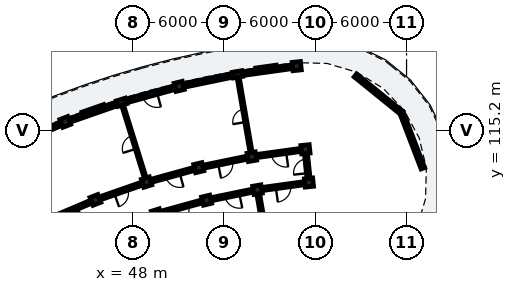
"""IFC4 building model, lengths in metres.
Left out: names, types, materials, properties, quantities, classifications, styles, units other than length and angle.
Written with IfcOpenShell. Run it as: python <this file> out.ifc"""

import sys

from ifc_helpers import new_model, si_unit, direction, frame, frame_2d, origin, origin_2d, place, context, subcontext, project, spatial, rectangle, extrude, element, fill, save


model = new_model("IFC4")
c1 = context("Model", 3, precision=1e-05, world=origin(), true_north=direction((0.0, 1.0)))
c2 = subcontext(c1, "Body", "Model", "MODEL_VIEW")
j1 = project(units=[si_unit("LENGTHUNIT", "METRE"), si_unit("PLANEANGLEUNIT", "RADIAN")], contexts=[c1])
p1 = place(None, origin())
s1 = spatial("IfcSite", under=j1, at=p1, CompositionType="ELEMENT")
p2 = place(p1, origin())
s2 = spatial("IfcBuilding", under=s1, at=p2, CompositionType="ELEMENT")
p3 = place(p2, frame((0.0, 0.0, 15.56)))
s3 = spatial("IfcBuildingStorey", under=s2, at=p3, CompositionType="ELEMENT", Elevation=15.56)
for number, where, z_axis, x_axis in (
    (1, (59.58, 111.766, 0.0), (0.0, 0.0, 1.0), (-0.105, 0.995, 0.0)),
    (2, (59.35, 113.954, 0.0), (0.0, 0.0, 1.0), (-0.105, 0.995, 0.0)),
    (3, (58.775, 119.424, 0.0), (0.0, 0.0, 1.0), (-0.105, 0.995, 0.0)),
    (4, (56.194, 111.297, 0.0), (0.0, 0.0, 1.0), (-0.17, 0.985, 0.0)),
    (5, (55.821, 113.465, 0.0), (0.0, 0.0, 1.0), (-0.17, 0.985, 0.0)),
):
    element("IfcColumn", number, at=place(p3, frame(where, z_axis=z_axis, x_axis=x_axis)), inside=s3, PredefinedType="COLUMN", context=c2, shape_type="SweptSolid", body=[
        extrude(rectangle(XDim=0.55, YDim=0.55, at=origin_2d()), origin(), (0.0, 0.0, 1.0), 3.11),
    ])
p4 = place(p3, frame((54.887, 118.885, 0.0), z_axis=(0.0, 0.0, 1.0), x_axis=(-0.169827298811, 0.985473839622, 0.0)))
e6 = element("IfcColumn", 6, at=p4, inside=s3, PredefinedType="PILASTER", context=c2, shape_type="SweptSolid", body=[
    extrude(rectangle(XDim=0.38, YDim=0.62, at=origin_2d()), origin(), (0.0, 0.0, 1.0), 3.11),
])
for number, where, z_axis, x_axis in (
    (7, (52.847, 110.606, 0.0), (0.0, 0.0, 1.0), (-0.234, 0.972, 0.0)),
    (8, (52.331, 112.744, 0.0), (0.0, 0.0, 1.0), (-0.234, 0.972, 0.0)),
    (9, (51.042, 118.091, 0.0), (0.0, 0.0, 1.0), (-0.234, 0.972, 0.0)),
    (10, (49.552, 109.695, 0.0), (0.0, 0.0, 1.0), (-0.298, 0.955, 0.0)),
    (11, (48.897, 111.795, 0.0), (0.0, 0.0, 1.0), (-0.298, 0.955, 0.0)),
):
    element("IfcColumn", number, at=place(p3, frame(where, z_axis=z_axis, x_axis=x_axis)), inside=s3, PredefinedType="COLUMN", context=c2, shape_type="SweptSolid", body=[
        extrude(rectangle(XDim=0.55, YDim=0.55, at=origin_2d()), origin(), (0.0, 0.0, 1.0), 3.11),
    ])
p5 = place(p3, frame((47.258, 117.046, 0.0), z_axis=(0.0, 0.0, 1.0), x_axis=(-0.297930292146, 0.954587628781, 0.0)))
e12 = element("IfcColumn", 12, at=p5, inside=s3, PredefinedType="PILASTER", context=c2, shape_type="SweptSolid", body=[
    extrude(rectangle(XDim=0.38, YDim=0.62, at=origin_2d()), origin(), (0.0, 0.0, 1.0), 3.11),
])
for number, where, z_axis, x_axis in (
    (13, (45.532, 110.622, 0.0), (0.0, 0.0, 1.0), (-0.36, 0.933, 0.0)),
    (14, (43.552, 115.753, 0.0), (0.0, 0.0, 1.0), (-0.36, 0.933, 0.0)),
):
    element("IfcColumn", number, at=place(p3, frame(where, z_axis=z_axis, x_axis=x_axis)), inside=s3, PredefinedType="COLUMN", context=c2, shape_type="SweptSolid", body=[
        extrude(rectangle(XDim=0.55, YDim=0.55, at=origin_2d()), origin(), (0.0, 0.0, 1.0), 3.11),
    ])
p6 = place(p3, frame((58.533, 119.39, 0.0), z_axis=(0.0, 0.0, 1.0), x_axis=(-0.990539718913, -0.137226328578, 0.0)))
e15 = element("IfcWall", 15, at=p6, inside=s3, PredefinedType="SOLIDWALL", context=c2, shape_type="SweptSolid", body=[
    extrude(rectangle(XDim=3.521, YDim=0.245, at=frame_2d((1.76, 0.0))), origin(), (0.0, 0.0, 1.0), 2.355),
])
p7 = place(p6, frame((1.085, 0.0, 0.35)))
e16 = element("IfcOpeningElement", 16, at=p7, cuts=e15, PredefinedType="OPENING", context=c2, shape_type="SweptSolid", body=[
    extrude(rectangle(XDim=1.35, YDim=1.65, at=frame_2d((0.675, 0.825))), frame((0.0, 0.133, 0.0), z_axis=(0.0, -1.0, 0.0), x_axis=(1.0, 0.0, 0.0)), (0.0, 0.0, 1.0), 0.265),
])
p8 = place(p3, frame((54.73, 118.853, 0.0), z_axis=(0.0, 0.0, 1.0), x_axis=(-0.979340051053, -0.202220336275, 0.0)))
e17 = element("IfcWall", 17, at=p8, inside=s3, PredefinedType="SOLIDWALL", context=c2, shape_type="SweptSolid", body=[
    extrude(rectangle(XDim=3.521, YDim=0.245, at=frame_2d((1.76, 0.0))), origin(), (0.0, 0.0, 1.0), 2.355),
])
p9 = place(p8, frame((1.01, 0.0, 0.35)))
e18 = element("IfcOpeningElement", 18, at=p9, cuts=e17, PredefinedType="OPENING", context=c2, shape_type="SweptSolid", body=[
    extrude(rectangle(XDim=1.5, YDim=1.7, at=frame_2d((0.75, 0.85))), frame((0.0, 0.133, 0.0), z_axis=(0.0, -1.0, 0.0), x_axis=(1.0, 0.0, 0.0)), (0.0, 0.0, 1.0), 0.265),
])
p10 = place(p3, frame((50.806, 118.026, 0.0), z_axis=(0.0, 0.0, 1.0), x_axis=(-0.963899390209, -0.266266718826, 0.0)))
e19 = element("IfcWall", 19, at=p10, inside=s3, PredefinedType="SOLIDWALL", context=c2, shape_type="SweptSolid", body=[
    extrude(rectangle(XDim=3.521, YDim=0.245, at=frame_2d((1.76, 0.0))), origin(), (0.0, 0.0, 1.0), 2.355),
])
p11 = place(p10, frame((1.271, 0.0, 0.0)))
e20 = element("IfcOpeningElement", 20, at=p11, cuts=e19, PredefinedType="OPENING", context=c2, shape_type="SweptSolid", body=[
    extrude(rectangle(XDim=0.98, YDim=2.12, at=frame_2d((0.49, 1.06))), frame((0.0, 0.133, 0.0), z_axis=(0.0, -1.0, 0.0), x_axis=(1.0, 0.0, 0.0)), (0.0, 0.0, 1.0), 0.265),
])
p12 = place(p3, frame((47.107, 116.993, 0.0), z_axis=(0.0, 0.0, 1.0), x_axis=(-0.944267366677, -0.329179495455, 0.0)))
e21 = element("IfcWall", 21, at=p12, inside=s3, PredefinedType="SOLIDWALL", context=c2, shape_type="SweptSolid", body=[
    extrude(rectangle(XDim=3.521, YDim=0.245, at=frame_2d((1.76, 0.0))), origin(), (0.0, 0.0, 1.0), 2.355),
])
p13 = place(p12, frame((0.86, 0.0, 0.35)))
e22 = element("IfcOpeningElement", 22, at=p13, cuts=e21, PredefinedType="OPENING", context=c2, shape_type="SweptSolid", body=[
    extrude(rectangle(XDim=1.8, YDim=1.85, at=frame_2d((0.9, 0.925))), frame((0.0, 0.133, 0.0), z_axis=(0.0, -1.0, 0.0), x_axis=(1.0, 0.0, 0.0)), (0.0, 0.0, 1.0), 0.265),
])
p14 = place(p3, frame((43.326, 115.657, 0.0), z_axis=(0.0, 0.0, 1.0), x_axis=(-0.920502438884, -0.390736816807, 0.0)))
e23 = element("IfcWall", 23, at=p14, inside=s3, PredefinedType="SOLIDWALL", context=c2, shape_type="SweptSolid", body=[
    extrude(rectangle(XDim=3.521, YDim=0.245, at=frame_2d((1.76, 0.0))), origin(), (0.0, 0.0, 1.0), 2.355),
])
p15 = place(p14, frame((1.12, 0.0, 0.55)))
e24 = element("IfcOpeningElement", 24, at=p15, cuts=e23, PredefinedType="OPENING", context=c2, shape_type="SweptSolid", body=[
    extrude(rectangle(XDim=1.28, YDim=1.52, at=frame_2d((0.64, 0.76))), frame((0.0, 0.133, 0.0), z_axis=(0.0, -1.0, 0.0), x_axis=(1.0, 0.0, 0.0)), (0.0, 0.0, 1.0), 0.265),
])
p16 = place(p3, frame((62.635, 118.812, 0.0), z_axis=(0.0, 0.0, 1.0), x_axis=(0.777137204109, -0.629331205321, 0.0)))
e25 = element("IfcWall", 25, at=p16, inside=s3, PredefinedType="SOLIDWALL", context=c2, shape_type="SweptSolid", body=[
    extrude(rectangle(XDim=3.908, YDim=0.245, at=frame_2d((1.954, 0.0))), origin(), (0.0, 0.0, 1.0), 2.355),
])
p17 = place(p16, frame((0.979, 0.0, 0.4)))
e26 = element("IfcOpeningElement", 26, at=p17, cuts=e25, PredefinedType="OPENING", context=c2, shape_type="SweptSolid", body=[
    extrude(rectangle(XDim=1.95, YDim=1.78, at=frame_2d((0.975, 0.89))), frame((0.0, 0.133, 0.0), z_axis=(0.0, -1.0, 0.0), x_axis=(1.0, 0.0, 0.0)), (0.0, 0.0, 1.0), 0.265),
])
p18 = place(p3, frame((65.673, 116.353, 0.0), z_axis=(0.0, 0.0, 1.0), x_axis=(0.358376224971, -0.933577249817, 0.0)))
e27 = element("IfcWall", 27, at=p18, inside=s3, PredefinedType="SOLIDWALL", context=c2, shape_type="SweptSolid", body=[
    extrude(rectangle(XDim=3.908, YDim=0.245, at=frame_2d((1.954, 0.0))), origin(), (0.0, 0.0, 1.0), 2.355),
])
p19 = place(p3, frame((59.004, 113.906, 0.0), z_axis=(0.0, 0.0, 1.0), x_axis=(-0.990544162976, -0.137194246211, 0.0)))
e28 = element("IfcWall", 28, at=p19, inside=s3, PredefinedType="PARTITIONING", context=c2, shape_type="SweptSolid", body=[
    extrude(rectangle(XDim=2.863, YDim=0.205, at=frame_2d((1.432, 0.0))), origin(), (0.0, 0.0, 1.0), 2.37),
])
p20 = place(p19, frame((0.937, 0.0, 0.0)))
e29 = element("IfcOpeningElement", 29, at=p20, cuts=e28, PredefinedType="OPENING", context=c2, shape_type="SweptSolid", body=[
    extrude(rectangle(XDim=0.99, YDim=2.16, at=frame_2d((0.495, 1.08))), frame((0.0, 0.113, 0.0), z_axis=(0.0, -1.0, 0.0), x_axis=(1.0, 0.0, 0.0)), (0.0, 0.0, 1.0), 0.225),
])
p21 = place(p3, frame((59.233, 111.718, 0.0), z_axis=(0.0, 0.0, 1.0), x_axis=(-0.990535404475, -0.137257467855, 0.0)))
e30 = element("IfcWall", 30, at=p21, inside=s3, PredefinedType="PARTITIONING", context=c2, shape_type="SweptSolid", body=[
    extrude(rectangle(XDim=2.718, YDim=0.205, at=frame_2d((1.359, 0.0))), origin(), (0.0, 0.0, 1.0), 2.37),
])
p22 = place(p21, frame((0.864, 0.0, 0.0)))
e31 = element("IfcOpeningElement", 31, at=p22, cuts=e30, PredefinedType="OPENING", context=c2, shape_type="SweptSolid", body=[
    extrude(rectangle(XDim=0.99, YDim=2.16, at=frame_2d((0.495, 1.08))), frame((0.0, 0.113, 0.0), z_axis=(0.0, -1.0, 0.0), x_axis=(1.0, 0.0, 0.0)), (0.0, 0.0, 1.0), 0.225),
])
p23 = place(p3, frame((55.753, 113.859, 0.0), z_axis=(0.0, 0.0, 1.0), x_axis=(-0.169812980219, 0.985476307046, 0.0)))
e32 = element("IfcWall", 32, at=p23, inside=s3, PredefinedType="PLUMBINGWALL", context=c2, shape_type="SweptSolid", body=[
    extrude(rectangle(XDim=4.7, YDim=0.14, at=frame_2d((2.35, 0.0))), origin(), (0.0, 0.0, 1.0), 2.37),
])
p24 = place(p23, frame((1.92, 0.0, 0.0)))
e33 = element("IfcOpeningElement", 33, at=p24, cuts=e32, PredefinedType="OPENING", context=c2, shape_type="SweptSolid", body=[
    extrude(rectangle(XDim=0.86, YDim=2.06, at=frame_2d((0.43, 1.03))), frame((0.0, 0.08, 0.0), z_axis=(0.0, -1.0, 0.0), x_axis=(1.0, 0.0, 0.0)), (0.0, 0.0, 1.0), 0.16),
])
p25 = place(p3, frame((57.383, 104.398, 0.0), z_axis=(0.0, 0.0, 1.0), x_axis=(-0.169825160084, 0.985474208187, 0.0)))
e34 = element("IfcWall", 34, at=p25, inside=s3, PredefinedType="PARTITIONING", context=c2, shape_type="SweptSolid", body=[
    extrude(rectangle(XDim=6.6, YDim=0.185, at=frame_2d((3.3, 0.0))), origin(), (0.0, 0.0, 1.0), 2.37),
])
p26 = place(p3, frame((55.478, 113.394, 0.0), z_axis=(0.0, 0.0, 1.0), x_axis=(-0.979348418612, -0.202179808492, 0.0)))
e35 = element("IfcWall", 35, at=p26, inside=s3, PredefinedType="PARTITIONING", context=c2, shape_type="SweptSolid", body=[
    extrude(rectangle(XDim=2.863, YDim=0.205, at=frame_2d((1.432, 0.0))), origin(), (0.0, 0.0, 1.0), 2.37),
])
p27 = place(p26, frame((0.947, 0.0, 0.0)))
e36 = element("IfcOpeningElement", 36, at=p27, cuts=e35, PredefinedType="OPENING", context=c2, shape_type="SweptSolid", body=[
    extrude(rectangle(XDim=0.97, YDim=2.15, at=frame_2d((0.485, 1.075))), frame((0.0, 0.113, 0.0), z_axis=(0.0, -1.0, 0.0), x_axis=(1.0, 0.0, 0.0)), (0.0, 0.0, 1.0), 0.225),
])
p28 = place(p3, frame((55.852, 111.226, 0.0), z_axis=(0.0, 0.0, 1.0), x_axis=(-0.979349423541, -0.202174940608, 0.0)))
e37 = element("IfcWall", 37, at=p28, inside=s3, PredefinedType="PARTITIONING", context=c2, shape_type="SweptSolid", body=[
    extrude(rectangle(XDim=2.718, YDim=0.205, at=frame_2d((1.359, 0.0))), origin(), (0.0, 0.0, 1.0), 2.37),
])
p29 = place(p28, frame((0.874, 0.0, 0.0)))
e38 = element("IfcOpeningElement", 38, at=p29, cuts=e37, PredefinedType="OPENING", context=c2, shape_type="SweptSolid", body=[
    extrude(rectangle(XDim=0.97, YDim=2.15, at=frame_2d((0.485, 1.075))), frame((0.0, 0.113, 0.0), z_axis=(0.0, -1.0, 0.0), x_axis=(1.0, 0.0, 0.0)), (0.0, 0.0, 1.0), 0.225),
])
p30 = place(p3, frame((51.994, 112.651, 0.0), z_axis=(0.0, 0.0, 1.0), x_axis=(-0.963890789093, -0.266297853356, 0.0)))
e39 = element("IfcWall", 39, at=p30, inside=s3, PredefinedType="PARTITIONING", context=c2, shape_type="SweptSolid", body=[
    extrude(rectangle(XDim=2.863, YDim=0.205, at=frame_2d((1.432, 0.0))), origin(), (0.0, 0.0, 1.0), 2.37),
])
p31 = place(p30, frame((0.957, 0.0, 0.0)))
e40 = element("IfcOpeningElement", 40, at=p31, cuts=e39, PredefinedType="OPENING", context=c2, shape_type="SweptSolid", body=[
    extrude(rectangle(XDim=0.95, YDim=2.13, at=frame_2d((0.475, 1.065))), frame((0.0, 0.113, 0.0), z_axis=(0.0, -1.0, 0.0), x_axis=(1.0, 0.0, 0.0)), (0.0, 0.0, 1.0), 0.225),
])
p32 = place(p3, frame((52.51, 110.512, 0.0), z_axis=(0.0, 0.0, 1.0), x_axis=(-0.96388375821, -0.266323301006, 0.0)))
e41 = element("IfcWall", 41, at=p32, inside=s3, PredefinedType="PARTITIONING", context=c2, shape_type="SweptSolid", body=[
    extrude(rectangle(XDim=2.718, YDim=0.205, at=frame_2d((1.359, 0.0))), origin(), (0.0, 0.0, 1.0), 2.37),
])
p33 = place(p32, frame((0.884, 0.0, 0.0)))
e42 = element("IfcOpeningElement", 42, at=p33, cuts=e41, PredefinedType="OPENING", context=c2, shape_type="SweptSolid", body=[
    extrude(rectangle(XDim=0.95, YDim=2.13, at=frame_2d((0.475, 1.065))), frame((0.0, 0.113, 0.0), z_axis=(0.0, -1.0, 0.0), x_axis=(1.0, 0.0, 0.0)), (0.0, 0.0, 1.0), 0.225),
])
p34 = place(p3, frame((48.778, 112.177, 0.0), z_axis=(0.0, 0.0, 1.0), x_axis=(-0.297905254614, 0.954595442726, 0.0)))
e43 = element("IfcWall", 43, at=p34, inside=s3, PredefinedType="PARTITIONING", context=c2, shape_type="SweptSolid", body=[
    extrude(rectangle(XDim=4.7, YDim=0.125, at=frame_2d((2.35, 0.0))), origin(), (0.0, 0.0, 1.0), 2.37),
])
p35 = place(p34, frame((1.895, 0.0, 0.0)))
e44 = element("IfcOpeningElement", 44, at=p35, cuts=e43, PredefinedType="OPENING", context=c2, shape_type="SweptSolid", body=[
    extrude(rectangle(XDim=0.91, YDim=2.1, at=frame_2d((0.455, 1.05))), frame((0.0, 0.073, 0.0), z_axis=(0.0, -1.0, 0.0), x_axis=(1.0, 0.0, 0.0)), (0.0, 0.0, 1.0), 0.145),
])
p36 = place(p3, frame((48.566, 111.68, 0.0), z_axis=(0.0, 0.0, 1.0), x_axis=(-0.944253820929, -0.329218349522, 0.0)))
e45 = element("IfcWall", 45, at=p36, inside=s3, PredefinedType="PARTITIONING", context=c2, shape_type="SweptSolid", body=[
    extrude(rectangle(XDim=2.863, YDim=0.205, at=frame_2d((1.432, 0.0))), origin(), (0.0, 0.0, 1.0), 2.37),
])
p37 = place(p36, frame((0.967, 0.0, 0.0)))
e46 = element("IfcOpeningElement", 46, at=p37, cuts=e45, PredefinedType="OPENING", context=c2, shape_type="SweptSolid", body=[
    extrude(rectangle(XDim=0.93, YDim=2.12, at=frame_2d((0.465, 1.06))), frame((0.0, 0.113, 0.0), z_axis=(0.0, -1.0, 0.0), x_axis=(1.0, 0.0, 0.0)), (0.0, 0.0, 1.0), 0.225),
])
p38 = place(p3, frame((45.21, 110.486, 0.0), z_axis=(0.0, 0.0, 1.0), x_axis=(-0.920511160294, -0.390716270168, 0.0)))
e47 = element("IfcWall", 47, at=p38, inside=s3, PredefinedType="PARTITIONING", context=c2, shape_type="SweptSolid", body=[
    extrude(rectangle(XDim=2.863, YDim=0.205, at=frame_2d((1.432, 0.0))), origin(), (0.0, 0.0, 1.0), 2.37),
])
p39 = place(p38, frame((0.937, 0.0, 0.0)))
e48 = element("IfcOpeningElement", 48, at=p39, cuts=e47, PredefinedType="OPENING", context=c2, shape_type="SweptSolid", body=[
    extrude(rectangle(XDim=0.99, YDim=2.16, at=frame_2d((0.495, 1.08))), frame((0.0, 0.113, 0.0), z_axis=(0.0, -1.0, 0.0), x_axis=(1.0, 0.0, 0.0)), (0.0, 0.0, 1.0), 0.225),
])
p40 = place(p3, frame((59.575, 111.816, 0.0), z_axis=(0.0, 0.0, 1.0), x_axis=(-0.104509292252, 0.994523910136, 0.0)))
e49 = element("IfcWall", 49, at=p40, inside=s3, PredefinedType="PARTITIONING", context=c2, shape_type="SweptSolid", body=[
    extrude(rectangle(XDim=2.1, YDim=0.205, at=frame_2d((1.05, 0.0))), origin(), (0.0, 0.0, 1.0), 2.37),
])
p41 = place(p40, frame((0.57, 0.0, 0.0)))
e50 = element("IfcOpeningElement", 50, at=p41, cuts=e49, PredefinedType="OPENING", context=c2, shape_type="SweptSolid", body=[
    extrude(rectangle(XDim=0.95, YDim=2.13, at=frame_2d((0.475, 1.065))), frame((0.0, 0.113, 0.0), z_axis=(0.0, -1.0, 0.0), x_axis=(1.0, 0.0, 0.0)), (0.0, 0.0, 1.0), 0.225),
])
p42 = place(p7, origin())
e51 = element("IfcWindow", 51, at=p42, inside=s3, PartitioningType="SINGLE_PANEL", PredefinedType="WINDOW", context=c2, shape_type="SweptSolid", body=[
    extrude(rectangle(XDim=1.35, YDim=1.65, at=frame_2d((0.675, 0.825))), frame((0.0, 0.03, 0.0), z_axis=(0.0, -1.0, 0.0), x_axis=(1.0, 0.0, 0.0)), (0.0, 0.0, 1.0), 0.06),
])
fill(e16, e51)
p43 = place(p9, origin())
e52 = element("IfcWindow", 52, at=p43, inside=s3, PartitioningType="SINGLE_PANEL", PredefinedType="WINDOW", context=c2, shape_type="SweptSolid", body=[
    extrude(rectangle(XDim=1.5, YDim=1.7, at=frame_2d((0.75, 0.85))), frame((0.0, 0.03, 0.0), z_axis=(0.0, -1.0, 0.0), x_axis=(1.0, 0.0, 0.0)), (0.0, 0.0, 1.0), 0.06),
])
fill(e18, e52)
p44 = place(p11, origin())
e53 = element("IfcDoor", 53, at=p44, inside=s3, OperationType="SINGLE_SWING_LEFT", PredefinedType="DOOR", context=c2, shape_type="SweptSolid", body=[
    extrude(rectangle(XDim=0.98, YDim=2.12, at=frame_2d((0.49, 1.06))), frame((0.0, 0.025, 0.0), z_axis=(0.0, -1.0, 0.0), x_axis=(1.0, 0.0, 0.0)), (0.0, 0.0, 1.0), 0.05),
])
fill(e20, e53)
p45 = place(p13, origin())
e54 = element("IfcWindow", 54, at=p45, inside=s3, PartitioningType="SINGLE_PANEL", PredefinedType="WINDOW", context=c2, shape_type="SweptSolid", body=[
    extrude(rectangle(XDim=1.8, YDim=1.85, at=frame_2d((0.9, 0.925))), frame((0.0, 0.03, 0.0), z_axis=(0.0, -1.0, 0.0), x_axis=(1.0, 0.0, 0.0)), (0.0, 0.0, 1.0), 0.06),
])
fill(e22, e54)
p46 = place(p17, origin())
e55 = element("IfcWindow", 55, at=p46, inside=s3, PartitioningType="SINGLE_PANEL", PredefinedType="WINDOW", context=c2, shape_type="SweptSolid", body=[
    extrude(rectangle(XDim=1.95, YDim=1.78, at=frame_2d((0.975, 0.89))), frame((0.0, 0.03, 0.0), z_axis=(0.0, -1.0, 0.0), x_axis=(1.0, 0.0, 0.0)), (0.0, 0.0, 1.0), 0.06),
])
fill(e26, e55)
p47 = place(p20, origin())
e56 = element("IfcDoor", 56, at=p47, inside=s3, OperationType="SINGLE_SWING_LEFT", PredefinedType="DOOR", context=c2, shape_type="SweptSolid", body=[
    extrude(rectangle(XDim=0.99, YDim=2.16, at=frame_2d((0.495, 1.08))), frame((0.0, 0.025, 0.0), z_axis=(0.0, -1.0, 0.0), x_axis=(1.0, 0.0, 0.0)), (0.0, 0.0, 1.0), 0.05),
])
fill(e29, e56)
p48 = place(p22, origin())
e57 = element("IfcDoor", 57, at=p48, inside=s3, OperationType="SINGLE_SWING_RIGHT", PredefinedType="DOOR", context=c2, shape_type="SweptSolid", body=[
    extrude(rectangle(XDim=0.99, YDim=2.16, at=frame_2d((0.495, 1.08))), frame((0.0, 0.025, 0.0), z_axis=(0.0, -1.0, 0.0), x_axis=(1.0, 0.0, 0.0)), (0.0, 0.0, 1.0), 0.05),
])
fill(e31, e57)
p49 = place(p24, origin())
e58 = element("IfcDoor", 58, at=p49, inside=s3, OperationType="SINGLE_SWING_LEFT", PredefinedType="DOOR", context=c2, shape_type="SweptSolid", body=[
    extrude(rectangle(XDim=0.86, YDim=2.06, at=frame_2d((0.43, 1.03))), frame((0.0, 0.025, 0.0), z_axis=(0.0, -1.0, 0.0), x_axis=(1.0, 0.0, 0.0)), (0.0, 0.0, 1.0), 0.05),
])
fill(e33, e58)
p50 = place(p27, origin())
e59 = element("IfcDoor", 59, at=p50, inside=s3, OperationType="SINGLE_SWING_RIGHT", PredefinedType="DOOR", context=c2, shape_type="SweptSolid", body=[
    extrude(rectangle(XDim=0.97, YDim=2.15, at=frame_2d((0.485, 1.075))), frame((0.0, 0.025, 0.0), z_axis=(0.0, -1.0, 0.0), x_axis=(1.0, 0.0, 0.0)), (0.0, 0.0, 1.0), 0.05),
])
fill(e36, e59)
p51 = place(p29, origin())
e60 = element("IfcDoor", 60, at=p51, inside=s3, OperationType="SINGLE_SWING_LEFT", PredefinedType="DOOR", context=c2, shape_type="SweptSolid", body=[
    extrude(rectangle(XDim=0.97, YDim=2.15, at=frame_2d((0.485, 1.075))), frame((0.0, 0.025, 0.0), z_axis=(0.0, -1.0, 0.0), x_axis=(1.0, 0.0, 0.0)), (0.0, 0.0, 1.0), 0.05),
])
fill(e38, e60)
p52 = place(p31, origin())
e61 = element("IfcDoor", 61, at=p52, inside=s3, OperationType="SINGLE_SWING_LEFT", PredefinedType="DOOR", context=c2, shape_type="SweptSolid", body=[
    extrude(rectangle(XDim=0.95, YDim=2.13, at=frame_2d((0.475, 1.065))), frame((0.0, 0.025, 0.0), z_axis=(0.0, -1.0, 0.0), x_axis=(1.0, 0.0, 0.0)), (0.0, 0.0, 1.0), 0.05),
])
fill(e40, e61)
p53 = place(p33, origin())
e62 = element("IfcDoor", 62, at=p53, inside=s3, OperationType="SINGLE_SWING_RIGHT", PredefinedType="DOOR", context=c2, shape_type="SweptSolid", body=[
    extrude(rectangle(XDim=0.95, YDim=2.13, at=frame_2d((0.475, 1.065))), frame((0.0, 0.025, 0.0), z_axis=(0.0, -1.0, 0.0), x_axis=(1.0, 0.0, 0.0)), (0.0, 0.0, 1.0), 0.05),
])
fill(e42, e62)
p54 = place(p35, origin())
e63 = element("IfcDoor", 63, at=p54, inside=s3, OperationType="SINGLE_SWING_LEFT", PredefinedType="DOOR", context=c2, shape_type="SweptSolid", body=[
    extrude(rectangle(XDim=0.91, YDim=2.1, at=frame_2d((0.455, 1.05))), frame((0.0, 0.025, 0.0), z_axis=(0.0, -1.0, 0.0), x_axis=(1.0, 0.0, 0.0)), (0.0, 0.0, 1.0), 0.05),
])
fill(e44, e63)
p55 = place(p37, origin())
e64 = element("IfcDoor", 64, at=p55, inside=s3, OperationType="SINGLE_SWING_RIGHT", PredefinedType="DOOR", context=c2, shape_type="SweptSolid", body=[
    extrude(rectangle(XDim=0.93, YDim=2.12, at=frame_2d((0.465, 1.06))), frame((0.0, 0.025, 0.0), z_axis=(0.0, -1.0, 0.0), x_axis=(1.0, 0.0, 0.0)), (0.0, 0.0, 1.0), 0.05),
])
fill(e46, e64)
p56 = place(p39, origin())
e65 = element("IfcDoor", 65, at=p56, inside=s3, OperationType="SINGLE_SWING_LEFT", PredefinedType="DOOR", context=c2, shape_type="SweptSolid", body=[
    extrude(rectangle(XDim=0.99, YDim=2.16, at=frame_2d((0.495, 1.08))), frame((0.0, 0.025, 0.0), z_axis=(0.0, -1.0, 0.0), x_axis=(1.0, 0.0, 0.0)), (0.0, 0.0, 1.0), 0.05),
])
fill(e48, e65)
p57 = place(p41, origin())
e66 = element("IfcDoor", 66, at=p57, inside=s3, OperationType="SINGLE_SWING_LEFT", PredefinedType="DOOR", context=c2, shape_type="SweptSolid", body=[
    extrude(rectangle(XDim=0.95, YDim=2.13, at=frame_2d((0.475, 1.065))), frame((0.0, 0.025, 0.0), z_axis=(0.0, -1.0, 0.0), x_axis=(1.0, 0.0, 0.0)), (0.0, 0.0, 1.0), 0.05),
])
fill(e50, e66)
save(model, sys.argv[1])
